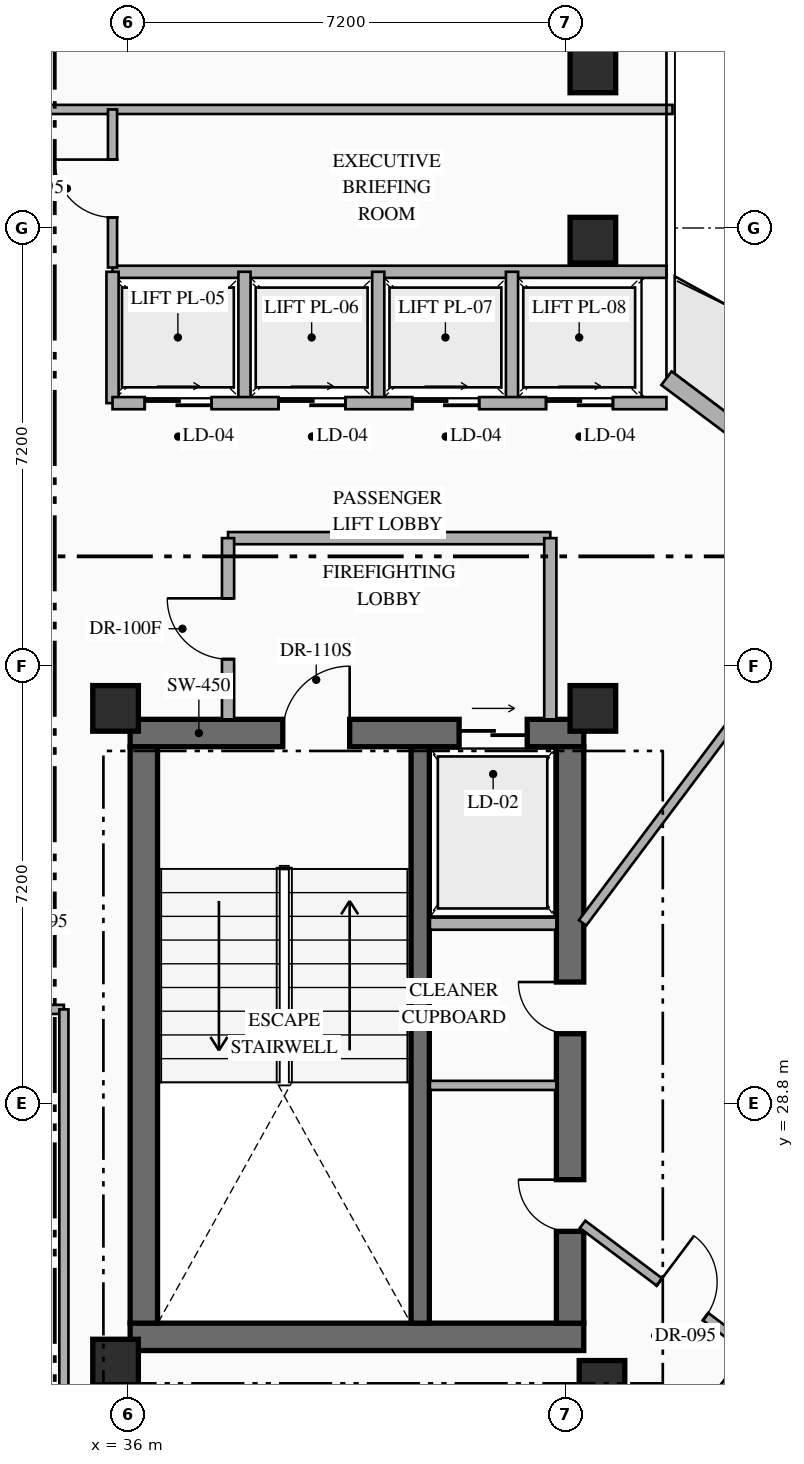
"""IFC4 building model, lengths in metres.
Left out: names, types, materials, properties, quantities, classifications, styles, units other than length and angle.
Written with IfcOpenShell. Run it as: python <this file> out.ifc"""

import sys

from ifc_helpers import new_model, si_unit, direction, frame, frame_2d, origin, origin_2d, place, context, subcontext, project, spatial, rectangle, hollow_rectangle, extrude, element, fill, save


model = new_model("IFC4")
c1 = context("Model", 3, precision=1e-05, world=origin(), true_north=direction((0.0, 1.0)))
c2 = subcontext(c1, "Body", "Model", "MODEL_VIEW")
j1 = project(units=[si_unit("LENGTHUNIT", "METRE"), si_unit("PLANEANGLEUNIT", "RADIAN")], contexts=[c1])
p1 = place(None, origin())
s1 = spatial("IfcSite", under=j1, at=p1, CompositionType="ELEMENT")
p2 = place(p1, origin())
s2 = spatial("IfcBuilding", under=s1, at=p2, CompositionType="ELEMENT")
p3 = place(p2, frame((0.0, 0.0, 198.75)))
s3 = spatial("IfcBuildingStorey", under=s2, at=p3, CompositionType="ELEMENT", Elevation=198.75)
p4 = place(p3, frame((36.04, 24.965, 0.0), z_axis=(0.0, 0.0, 1.0), x_axis=(1.0, 0.0, 0.0)))
e1 = element("IfcWall", 1, at=p4, inside=s3, PredefinedType="SHEAR", context=c2, shape_type="SweptSolid", body=[
    extrude(rectangle(XDim=7.46, YDim=0.45, at=frame_2d((3.73, 0.0))), origin(), (0.0, 0.0, 1.0), 3.6),
])
p5 = place(p3, frame((36.04, 34.895, 0.0), z_axis=(0.0, 0.0, 1.0), x_axis=(1.0, 0.0, 0.0)))
e2 = element("IfcWall", 2, at=p5, inside=s3, PredefinedType="SHEAR", context=c2, shape_type="SweptSolid", body=[
    extrude(rectangle(XDim=7.46, YDim=0.45, at=frame_2d((3.73, 0.0))), origin(), (0.0, 0.0, 1.0), 3.6),
])
p6 = place(p5, frame((2.51, 0.0, 0.0)))
e3 = element("IfcOpeningElement", 3, at=p6, cuts=e2, PredefinedType="OPENING", context=c2, shape_type="SweptSolid", body=[
    extrude(rectangle(XDim=1.1, YDim=2.2, at=frame_2d((0.55, 1.1))), frame((0.0, 0.235, 0.0), z_axis=(0.0, -1.0, 0.0), x_axis=(1.0, 0.0, 0.0)), (0.0, 0.0, 1.0), 0.47),
])
p7 = place(p5, frame((5.41, 0.0, 0.0)))
e4 = element("IfcOpeningElement", 4, at=p7, cuts=e2, PredefinedType="OPENING", context=c2, shape_type="SweptSolid", body=[
    extrude(rectangle(XDim=1.12, YDim=2.15, at=frame_2d((0.56, 1.075))), frame((0.0, 0.235, 0.0), z_axis=(0.0, -1.0, 0.0), x_axis=(1.0, 0.0, 0.0)), (0.0, 0.0, 1.0), 0.47),
])
p8 = place(p3, frame((36.265, 25.19, 0.0), z_axis=(0.0, 0.0, 1.0), x_axis=(0.0, 1.0, 0.0)))
e5 = element("IfcWall", 5, at=p8, inside=s3, PredefinedType="SHEAR", context=c2, shape_type="SweptSolid", body=[
    extrude(rectangle(XDim=9.48, YDim=0.45, at=frame_2d((4.74, 0.0))), origin(), (0.0, 0.0, 1.0), 3.6),
])
p9 = place(p3, frame((43.275, 25.19, 0.0), z_axis=(0.0, 0.0, 1.0), x_axis=(0.0, 1.0, 0.0)))
e6 = element("IfcWall", 6, at=p9, inside=s3, PredefinedType="SHEAR", context=c2, shape_type="SweptSolid", body=[
    extrude(rectangle(XDim=9.48, YDim=0.45, at=frame_2d((4.74, 0.0))), origin(), (0.0, 0.0, 1.0), 3.6),
])
p10 = place(p9, frame((1.51, 0.0, 0.0)))
e7 = element("IfcOpeningElement", 7, at=p10, cuts=e6, PredefinedType="OPENING", context=c2, shape_type="SweptSolid", body=[
    extrude(rectangle(XDim=0.85, YDim=2.08, at=frame_2d((0.425, 1.04))), frame((0.0, 0.235, 0.0), z_axis=(0.0, -1.0, 0.0), x_axis=(1.0, 0.0, 0.0)), (0.0, 0.0, 1.0), 0.47),
])
p11 = place(p9, frame((4.76, 0.0, 0.0)))
e8 = element("IfcOpeningElement", 8, at=p11, cuts=e6, PredefinedType="OPENING", context=c2, shape_type="SweptSolid", body=[
    extrude(rectangle(XDim=0.85, YDim=2.08, at=frame_2d((0.425, 1.04))), frame((0.0, 0.235, 0.0), z_axis=(0.0, -1.0, 0.0), x_axis=(1.0, 0.0, 0.0)), (0.0, 0.0, 1.0), 0.47),
])
p12 = place(p3, frame((40.81, 25.19, 0.0), z_axis=(0.0, 0.0, 1.0), x_axis=(0.0, 1.0, 0.0)))
e9 = element("IfcWall", 9, at=p12, inside=s3, PredefinedType="SHEAR", context=c2, shape_type="SweptSolid", body=[
    extrude(rectangle(XDim=9.48, YDim=0.3, at=frame_2d((4.74, 0.0))), origin(), (0.0, 0.0, 1.0), 3.6),
])
for number, where, z_axis, x_axis in (
    (10, (35.8, 24.55, 0.0), (0.0, 0.0, 1.0), (1.0, 0.0, 0.0)),
    (11, (43.8, 24.2, 0.0), (0.0, 0.0, 1.0), (1.0, 0.0, 0.0)),
    (12, (35.8, 35.3, 0.0), (0.0, 0.0, 1.0), (1.0, 0.0, 0.0)),
    (13, (43.65, 35.3, 0.0), (0.0, 0.0, 1.0), (1.0, 0.0, 0.0)),
    (14, (43.65, 43.0, 0.0), (0.0, 0.0, 1.0), (1.0, 0.0, 0.0)),
    (15, (43.65, 45.8, 0.0), (0.0, 0.0, 1.0), (1.0, 0.0, 0.0)),
):
    element("IfcColumn", number, at=place(p3, frame(where, z_axis=z_axis, x_axis=x_axis)), inside=s3, PredefinedType="COLUMN", context=c2, shape_type="SweptSolid", body=[
        extrude(hollow_rectangle(XDim=0.75, YDim=0.75, WallThickness=0.028, at=origin_2d()), origin(), (0.0, 0.0, 1.0), 3.6),
    ])
p13 = place(p3, frame((44.86, 40.73, 0.0), z_axis=(0.0, 0.0, 1.0), x_axis=(0.800007624502, -0.599989833863, 0.0)))
e16 = element("IfcWall", 16, at=p13, inside=s3, PredefinedType="STANDARD", context=c2, shape_type="SweptSolid", body=[
    extrude(rectangle(XDim=19.212, YDim=0.28, at=frame_2d((9.606, 0.0))), origin(), (0.0, 0.0, 1.0), 3.35),
])
p14 = place(p13, frame((1.755, 0.0, 0.0)))
e17 = element("IfcOpeningElement", 17, at=p14, cuts=e16, PredefinedType="OPENING", context=c2, shape_type="SweptSolid", body=[
    extrude(rectangle(XDim=1.1, YDim=2.2, at=frame_2d((0.55, 1.1))), frame((0.0, 0.15, 0.0), z_axis=(0.0, -1.0, 0.0), x_axis=(1.0, 0.0, 0.0)), (0.0, 0.0, 1.0), 0.3),
])
p15 = place(p13, frame((13.509, 0.0, 0.85)))
e18 = element("IfcOpeningElement", 18, at=p15, cuts=e16, PredefinedType="OPENING", context=c2, shape_type="SweptSolid", body=[
    extrude(rectangle(XDim=1.8, YDim=2.1, at=frame_2d((0.9, 1.05))), frame((0.0, 0.15, 0.0), z_axis=(0.0, -1.0, 0.0), x_axis=(1.0, 0.0, 0.0)), (0.0, 0.0, 1.0), 0.3),
])
p16 = place(p3, frame((40.97, 31.76, 0.0), z_axis=(0.0, 0.0, 1.0), x_axis=(1.0, 0.0, 0.0)))
e19 = element("IfcWall", 19, at=p16, inside=s3, PredefinedType="STANDARD", context=c2, shape_type="SweptSolid", body=[
    extrude(rectangle(XDim=2.08, YDim=0.2, at=frame_2d((1.04, 0.0))), origin(), (0.0, 0.0, 1.0), 3.35),
])
p17 = place(p3, frame((40.97, 29.1, 0.0), z_axis=(0.0, 0.0, 1.0), x_axis=(1.0, 0.0, 0.0)))
e20 = element("IfcWall", 20, at=p17, inside=s3, PredefinedType="PARTITIONING", context=c2, shape_type="SweptSolid", body=[
    extrude(rectangle(XDim=2.08, YDim=0.15, at=frame_2d((1.04, 0.0))), origin(), (0.0, 0.0, 1.0), 3.35),
])
p18 = place(p3, frame((37.65, 38.1, 0.0), z_axis=(0.0, 0.0, 1.0), x_axis=(1.0, 0.0, 0.0)))
e21 = element("IfcWall", 21, at=p18, inside=s3, PredefinedType="STANDARD", context=c2, shape_type="SweptSolid", body=[
    extrude(rectangle(XDim=5.3, YDim=0.2, at=frame_2d((2.65, 0.0))), origin(), (0.0, 0.0, 1.0), 3.35),
])
p19 = place(p3, frame((42.95, 35.12, 0.0), z_axis=(0.0, 0.0, 1.0), x_axis=(0.0, 1.0, 0.0)))
e22 = element("IfcWall", 22, at=p19, inside=s3, PredefinedType="STANDARD", context=c2, shape_type="SweptSolid", body=[
    extrude(rectangle(XDim=2.98, YDim=0.2, at=frame_2d((1.49, 0.0))), origin(), (0.0, 0.0, 1.0), 3.35),
])
p20 = place(p3, frame((37.65, 35.12, 0.0), z_axis=(0.0, 0.0, 1.0), x_axis=(0.0, 1.0, 0.0)))
e23 = element("IfcWall", 23, at=p20, inside=s3, PredefinedType="STANDARD", context=c2, shape_type="SweptSolid", body=[
    extrude(rectangle(XDim=2.98, YDim=0.2, at=frame_2d((1.49, 0.0))), origin(), (0.0, 0.0, 1.0), 3.35),
])
p21 = place(p20, frame((0.99, 0.0, 0.0)))
e24 = element("IfcOpeningElement", 24, at=p21, cuts=e23, PredefinedType="OPENING", context=c2, shape_type="SweptSolid", body=[
    extrude(rectangle(XDim=1.0, YDim=2.2, at=frame_2d((0.5, 1.1))), frame((0.0, 0.11, 0.0), z_axis=(0.0, -1.0, 0.0), x_axis=(1.0, 0.0, 0.0)), (0.0, 0.0, 1.0), 0.22),
])
p22 = place(p3, frame((35.75, 42.48, 0.0), z_axis=(0.0, 0.0, 1.0), x_axis=(1.0, 0.0, 0.0)))
e25 = element("IfcWall", 25, at=p22, inside=s3, PredefinedType="STANDARD", context=c2, shape_type="SweptSolid", body=[
    extrude(rectangle(XDim=9.11, YDim=0.2, at=frame_2d((4.555, 0.0))), origin(), (0.0, 0.0, 1.0), 3.35),
])
for number, where, z_axis, x_axis in (
    (26, (35.75, 40.32, 0.0), (0.0, 0.0, 1.0), (0.0, 1.0, 0.0)),
    (27, (37.92, 40.32, 0.0), (0.0, 0.0, 1.0), (0.0, 1.0, 0.0)),
    (28, (40.12, 40.32, 0.0), (0.0, 0.0, 1.0), (0.0, 1.0, 0.0)),
    (29, (42.32, 40.32, 0.0), (0.0, 0.0, 1.0), (0.0, 1.0, 0.0)),
):
    element("IfcWall", number, at=place(p3, frame(where, z_axis=z_axis, x_axis=x_axis)), inside=s3, PredefinedType="STANDARD", context=c2, shape_type="SweptSolid", body=[
        extrude(rectangle(XDim=2.16, YDim=0.2, at=frame_2d((1.08, 0.0))), origin(), (0.0, 0.0, 1.0), 3.35),
    ])
p23 = place(p3, frame((35.75, 40.32, 0.0), z_axis=(0.0, 0.0, 1.0), x_axis=(1.0, 0.0, 0.0)))
e30 = element("IfcWall", 30, at=p23, inside=s3, PredefinedType="STANDARD", context=c2, shape_type="SweptSolid", body=[
    extrude(rectangle(XDim=9.11, YDim=0.2, at=frame_2d((4.555, 0.0))), origin(), (0.0, 0.0, 1.0), 3.35),
])
p24 = place(p23, frame((0.53, 0.0, 0.0)))
e31 = element("IfcOpeningElement", 31, at=p24, cuts=e30, PredefinedType="OPENING", context=c2, shape_type="SweptSolid", body=[
    extrude(rectangle(XDim=1.1, YDim=2.18, at=frame_2d((0.55, 1.09))), frame((0.0, 0.11, 0.0), z_axis=(0.0, -1.0, 0.0), x_axis=(1.0, 0.0, 0.0)), (0.0, 0.0, 1.0), 0.22),
])
p25 = place(p23, frame((2.73, 0.0, 0.0)))
e32 = element("IfcOpeningElement", 32, at=p25, cuts=e30, PredefinedType="OPENING", context=c2, shape_type="SweptSolid", body=[
    extrude(rectangle(XDim=1.1, YDim=2.18, at=frame_2d((0.55, 1.09))), frame((0.0, 0.11, 0.0), z_axis=(0.0, -1.0, 0.0), x_axis=(1.0, 0.0, 0.0)), (0.0, 0.0, 1.0), 0.22),
])
p26 = place(p23, frame((4.93, 0.0, 0.0)))
e33 = element("IfcOpeningElement", 33, at=p26, cuts=e30, PredefinedType="OPENING", context=c2, shape_type="SweptSolid", body=[
    extrude(rectangle(XDim=1.1, YDim=2.18, at=frame_2d((0.55, 1.09))), frame((0.0, 0.11, 0.0), z_axis=(0.0, -1.0, 0.0), x_axis=(1.0, 0.0, 0.0)), (0.0, 0.0, 1.0), 0.22),
])
p27 = place(p23, frame((7.13, 0.0, 0.0)))
e34 = element("IfcOpeningElement", 34, at=p27, cuts=e30, PredefinedType="OPENING", context=c2, shape_type="SweptSolid", body=[
    extrude(rectangle(XDim=1.1, YDim=2.18, at=frame_2d((0.55, 1.09))), frame((0.0, 0.11, 0.0), z_axis=(0.0, -1.0, 0.0), x_axis=(1.0, 0.0, 0.0)), (0.0, 0.0, 1.0), 0.22),
])
p28 = place(p3, frame((30.5, 30.35, 0.0), z_axis=(0.0, 0.0, 1.0), x_axis=(1.0, 0.0, 0.0)))
e35 = element("IfcWall", 35, at=p28, inside=s3, PredefinedType="PARTITIONING", context=c2, shape_type="SweptSolid", body=[
    extrude(rectangle(XDim=4.45, YDim=0.15, at=frame_2d((2.225, 0.0))), origin(), (0.0, 0.0, 1.0), 3.35),
])
p29 = place(p28, frame((2.846, 0.0, 0.0)))
e36 = element("IfcOpeningElement", 36, at=p29, cuts=e35, PredefinedType="OPENING", context=c2, shape_type="SweptSolid", body=[
    extrude(rectangle(XDim=0.95, YDim=2.15, at=frame_2d((0.475, 1.075))), frame((0.0, 0.085, 0.0), z_axis=(0.0, -1.0, 0.0), x_axis=(1.0, 0.0, 0.0)), (0.0, 0.0, 1.0), 0.17),
])
p30 = place(p3, frame((34.95, 23.2, 0.0), z_axis=(0.0, 0.0, 1.0), x_axis=(0.0, 1.0, 0.0)))
e37 = element("IfcWall", 37, at=p30, inside=s3, PredefinedType="PARTITIONING", context=c2, shape_type="SweptSolid", body=[
    extrude(rectangle(XDim=7.15, YDim=0.15, at=frame_2d((3.575, 0.0))), origin(), (0.0, 0.0, 1.0), 3.35),
])
p31 = place(p3, frame((20.9, 45.15, 0.0), z_axis=(0.0, 0.0, 1.0), x_axis=(1.0, 0.0, 0.0)))
e38 = element("IfcWall", 38, at=p31, inside=s3, PredefinedType="PARTITIONING", context=c2, shape_type="SweptSolid", body=[
    extrude(rectangle(XDim=24.06, YDim=0.15, at=frame_2d((12.03, 0.0))), origin(), (0.0, 0.0, 1.0), 3.35),
])
p32 = place(p31, frame((9.32, 0.0, 0.0)))
e39 = element("IfcOpeningElement", 39, at=p32, cuts=e38, PredefinedType="OPENING", context=c2, shape_type="SweptSolid", body=[
    extrude(rectangle(XDim=0.95, YDim=2.15, at=frame_2d((0.475, 1.075))), frame((0.0, 0.085, 0.0), z_axis=(0.0, -1.0, 0.0), x_axis=(1.0, 0.0, 0.0)), (0.0, 0.0, 1.0), 0.17),
])
p33 = place(p3, frame((42.72, 20.01, 0.0), z_axis=(0.0, 0.0, 1.0), x_axis=(0.600013020683, 0.799990234322, 0.0)))
e40 = element("IfcWall", 40, at=p33, inside=s3, PredefinedType="PARTITIONING", context=c2, shape_type="SweptSolid", body=[
    extrude(rectangle(XDim=9.0, YDim=0.15, at=frame_2d((4.5, 0.0))), origin(), (0.0, 0.0, 1.0), 3.35),
])
p34 = place(p33, frame((2.202, 0.0, 0.0)))
e41 = element("IfcOpeningElement", 41, at=p34, cuts=e40, PredefinedType="OPENING", context=c2, shape_type="SweptSolid", body=[
    extrude(rectangle(XDim=0.95, YDim=2.15, at=frame_2d((0.475, 1.075))), frame((0.0, 0.085, 0.0), z_axis=(0.0, -1.0, 0.0), x_axis=(1.0, 0.0, 0.0)), (0.0, 0.0, 1.0), 0.17),
])
p35 = place(p3, frame((43.48, 26.815, 0.0), z_axis=(0.0, 0.0, 1.0), x_axis=(0.800008430676, -0.599988758934, 0.0)))
e42 = element("IfcWall", 42, at=p35, inside=s3, PredefinedType="PARTITIONING", context=c2, shape_type="SweptSolid", body=[
    extrude(rectangle(XDim=3.475, YDim=0.15, at=frame_2d((1.738, 0.0))), origin(), (0.0, 0.0, 1.0), 3.35),
])
p36 = place(p35, frame((1.58, 0.0, 0.0)))
e43 = element("IfcOpeningElement", 43, at=p36, cuts=e42, PredefinedType="OPENING", context=c2, shape_type="SweptSolid", body=[
    extrude(rectangle(XDim=0.95, YDim=2.15, at=frame_2d((0.475, 1.075))), frame((0.0, 0.085, 0.0), z_axis=(0.0, -1.0, 0.0), x_axis=(1.0, 0.0, 0.0)), (0.0, 0.0, 1.0), 0.17),
])
p37 = place(p3, frame((43.48, 31.773, 0.0), z_axis=(0.0, 0.0, 1.0), x_axis=(0.599971041729, 0.800021717885, 0.0)))
e44 = element("IfcWall", 44, at=p37, inside=s3, PredefinedType="PARTITIONING", context=c2, shape_type="SweptSolid", body=[
    extrude(rectangle(XDim=8.094, YDim=0.15, at=frame_2d((4.047, 0.0))), origin(), (0.0, 0.0, 1.0), 3.35),
])
p38 = place(p3, frame((35.75, 42.55, 0.0), z_axis=(0.0, 0.0, 1.0), x_axis=(0.0, 1.0, 0.0)))
e45 = element("IfcWall", 45, at=p38, inside=s3, PredefinedType="PARTITIONING", context=c2, shape_type="SweptSolid", body=[
    extrude(rectangle(XDim=2.6, YDim=0.15, at=frame_2d((1.3, 0.0))), origin(), (0.0, 0.0, 1.0), 3.35),
])
p39 = place(p38, frame((0.825, 0.0, 0.0)))
e46 = element("IfcOpeningElement", 46, at=p39, cuts=e45, PredefinedType="OPENING", context=c2, shape_type="SweptSolid", body=[
    extrude(rectangle(XDim=0.95, YDim=2.15, at=frame_2d((0.475, 1.075))), frame((0.0, 0.085, 0.0), z_axis=(0.0, -1.0, 0.0), x_axis=(1.0, 0.0, 0.0)), (0.0, 0.0, 1.0), 0.17),
])
p40 = place(p6, origin())
e47 = element("IfcDoor", 47, at=p40, inside=s3, OperationType="SINGLE_SWING_RIGHT", PredefinedType="DOOR", context=c2, shape_type="SweptSolid", body=[
    extrude(rectangle(XDim=1.1, YDim=2.2, at=frame_2d((0.55, 1.1))), frame((0.0, 0.025, 0.0), z_axis=(0.0, -1.0, 0.0), x_axis=(1.0, 0.0, 0.0)), (0.0, 0.0, 1.0), 0.05),
])
fill(e3, e47)
p41 = place(p7, origin())
e48 = element("IfcDoor", 48, at=p41, inside=s3, OperationType="SLIDING_TO_RIGHT", PredefinedType="USERDEFINED", context=c2, shape_type="SweptSolid", body=[
    extrude(rectangle(XDim=1.12, YDim=2.15, at=frame_2d((0.56, 1.075))), frame((0.0, 0.025, 0.0), z_axis=(0.0, -1.0, 0.0), x_axis=(1.0, 0.0, 0.0)), (0.0, 0.0, 1.0), 0.05),
])
fill(e4, e48)
p42 = place(p10, origin())
e49 = element("IfcDoor", 49, at=p42, inside=s3, OperationType="SINGLE_SWING_RIGHT", PredefinedType="DOOR", context=c2, shape_type="SweptSolid", body=[
    extrude(rectangle(XDim=0.85, YDim=2.08, at=frame_2d((0.425, 1.04))), frame((0.0, 0.025, 0.0), z_axis=(0.0, -1.0, 0.0), x_axis=(1.0, 0.0, 0.0)), (0.0, 0.0, 1.0), 0.05),
])
fill(e7, e49)
p43 = place(p11, origin())
e50 = element("IfcDoor", 50, at=p43, inside=s3, OperationType="SINGLE_SWING_RIGHT", PredefinedType="DOOR", context=c2, shape_type="SweptSolid", body=[
    extrude(rectangle(XDim=0.85, YDim=2.08, at=frame_2d((0.425, 1.04))), frame((0.0, 0.025, 0.0), z_axis=(0.0, -1.0, 0.0), x_axis=(1.0, 0.0, 0.0)), (0.0, 0.0, 1.0), 0.05),
])
fill(e8, e50)
p44 = place(p21, origin())
e51 = element("IfcDoor", 51, at=p44, inside=s3, OperationType="SINGLE_SWING_RIGHT", PredefinedType="DOOR", context=c2, shape_type="SweptSolid", body=[
    extrude(rectangle(XDim=1.0, YDim=2.2, at=frame_2d((0.5, 1.1))), frame((0.0, 0.025, 0.0), z_axis=(0.0, -1.0, 0.0), x_axis=(1.0, 0.0, 0.0)), (0.0, 0.0, 1.0), 0.05),
])
fill(e24, e51)
p45 = place(p24, origin())
e52 = element("IfcDoor", 52, at=p45, inside=s3, OperationType="SLIDING_TO_RIGHT", PredefinedType="USERDEFINED", context=c2, shape_type="SweptSolid", body=[
    extrude(rectangle(XDim=1.1, YDim=2.18, at=frame_2d((0.55, 1.09))), frame((0.0, 0.025, 0.0), z_axis=(0.0, -1.0, 0.0), x_axis=(1.0, 0.0, 0.0)), (0.0, 0.0, 1.0), 0.05),
])
fill(e31, e52)
p46 = place(p25, origin())
e53 = element("IfcDoor", 53, at=p46, inside=s3, OperationType="SLIDING_TO_RIGHT", PredefinedType="USERDEFINED", context=c2, shape_type="SweptSolid", body=[
    extrude(rectangle(XDim=1.1, YDim=2.18, at=frame_2d((0.55, 1.09))), frame((0.0, 0.025, 0.0), z_axis=(0.0, -1.0, 0.0), x_axis=(1.0, 0.0, 0.0)), (0.0, 0.0, 1.0), 0.05),
])
fill(e32, e53)
p47 = place(p26, origin())
e54 = element("IfcDoor", 54, at=p47, inside=s3, OperationType="SLIDING_TO_RIGHT", PredefinedType="USERDEFINED", context=c2, shape_type="SweptSolid", body=[
    extrude(rectangle(XDim=1.1, YDim=2.18, at=frame_2d((0.55, 1.09))), frame((0.0, 0.025, 0.0), z_axis=(0.0, -1.0, 0.0), x_axis=(1.0, 0.0, 0.0)), (0.0, 0.0, 1.0), 0.05),
])
fill(e33, e54)
p48 = place(p27, origin())
e55 = element("IfcDoor", 55, at=p48, inside=s3, OperationType="SLIDING_TO_RIGHT", PredefinedType="USERDEFINED", context=c2, shape_type="SweptSolid", body=[
    extrude(rectangle(XDim=1.1, YDim=2.18, at=frame_2d((0.55, 1.09))), frame((0.0, 0.025, 0.0), z_axis=(0.0, -1.0, 0.0), x_axis=(1.0, 0.0, 0.0)), (0.0, 0.0, 1.0), 0.05),
])
fill(e34, e55)
p49 = place(p36, origin())
e56 = element("IfcDoor", 56, at=p49, inside=s3, OperationType="SINGLE_SWING_LEFT", PredefinedType="DOOR", context=c2, shape_type="SweptSolid", body=[
    extrude(rectangle(XDim=0.95, YDim=2.15, at=frame_2d((0.475, 1.075))), frame((0.0, 0.025, 0.0), z_axis=(0.0, -1.0, 0.0), x_axis=(1.0, 0.0, 0.0)), (0.0, 0.0, 1.0), 0.05),
])
fill(e43, e56)
p50 = place(p39, origin())
e57 = element("IfcDoor", 57, at=p50, inside=s3, OperationType="SINGLE_SWING_RIGHT", PredefinedType="DOOR", context=c2, shape_type="SweptSolid", body=[
    extrude(rectangle(XDim=0.95, YDim=2.15, at=frame_2d((0.475, 1.075))), frame((0.0, 0.025, 0.0), z_axis=(0.0, -1.0, 0.0), x_axis=(1.0, 0.0, 0.0)), (0.0, 0.0, 1.0), 0.05),
])
fill(e46, e57)
save(model, sys.argv[1])
